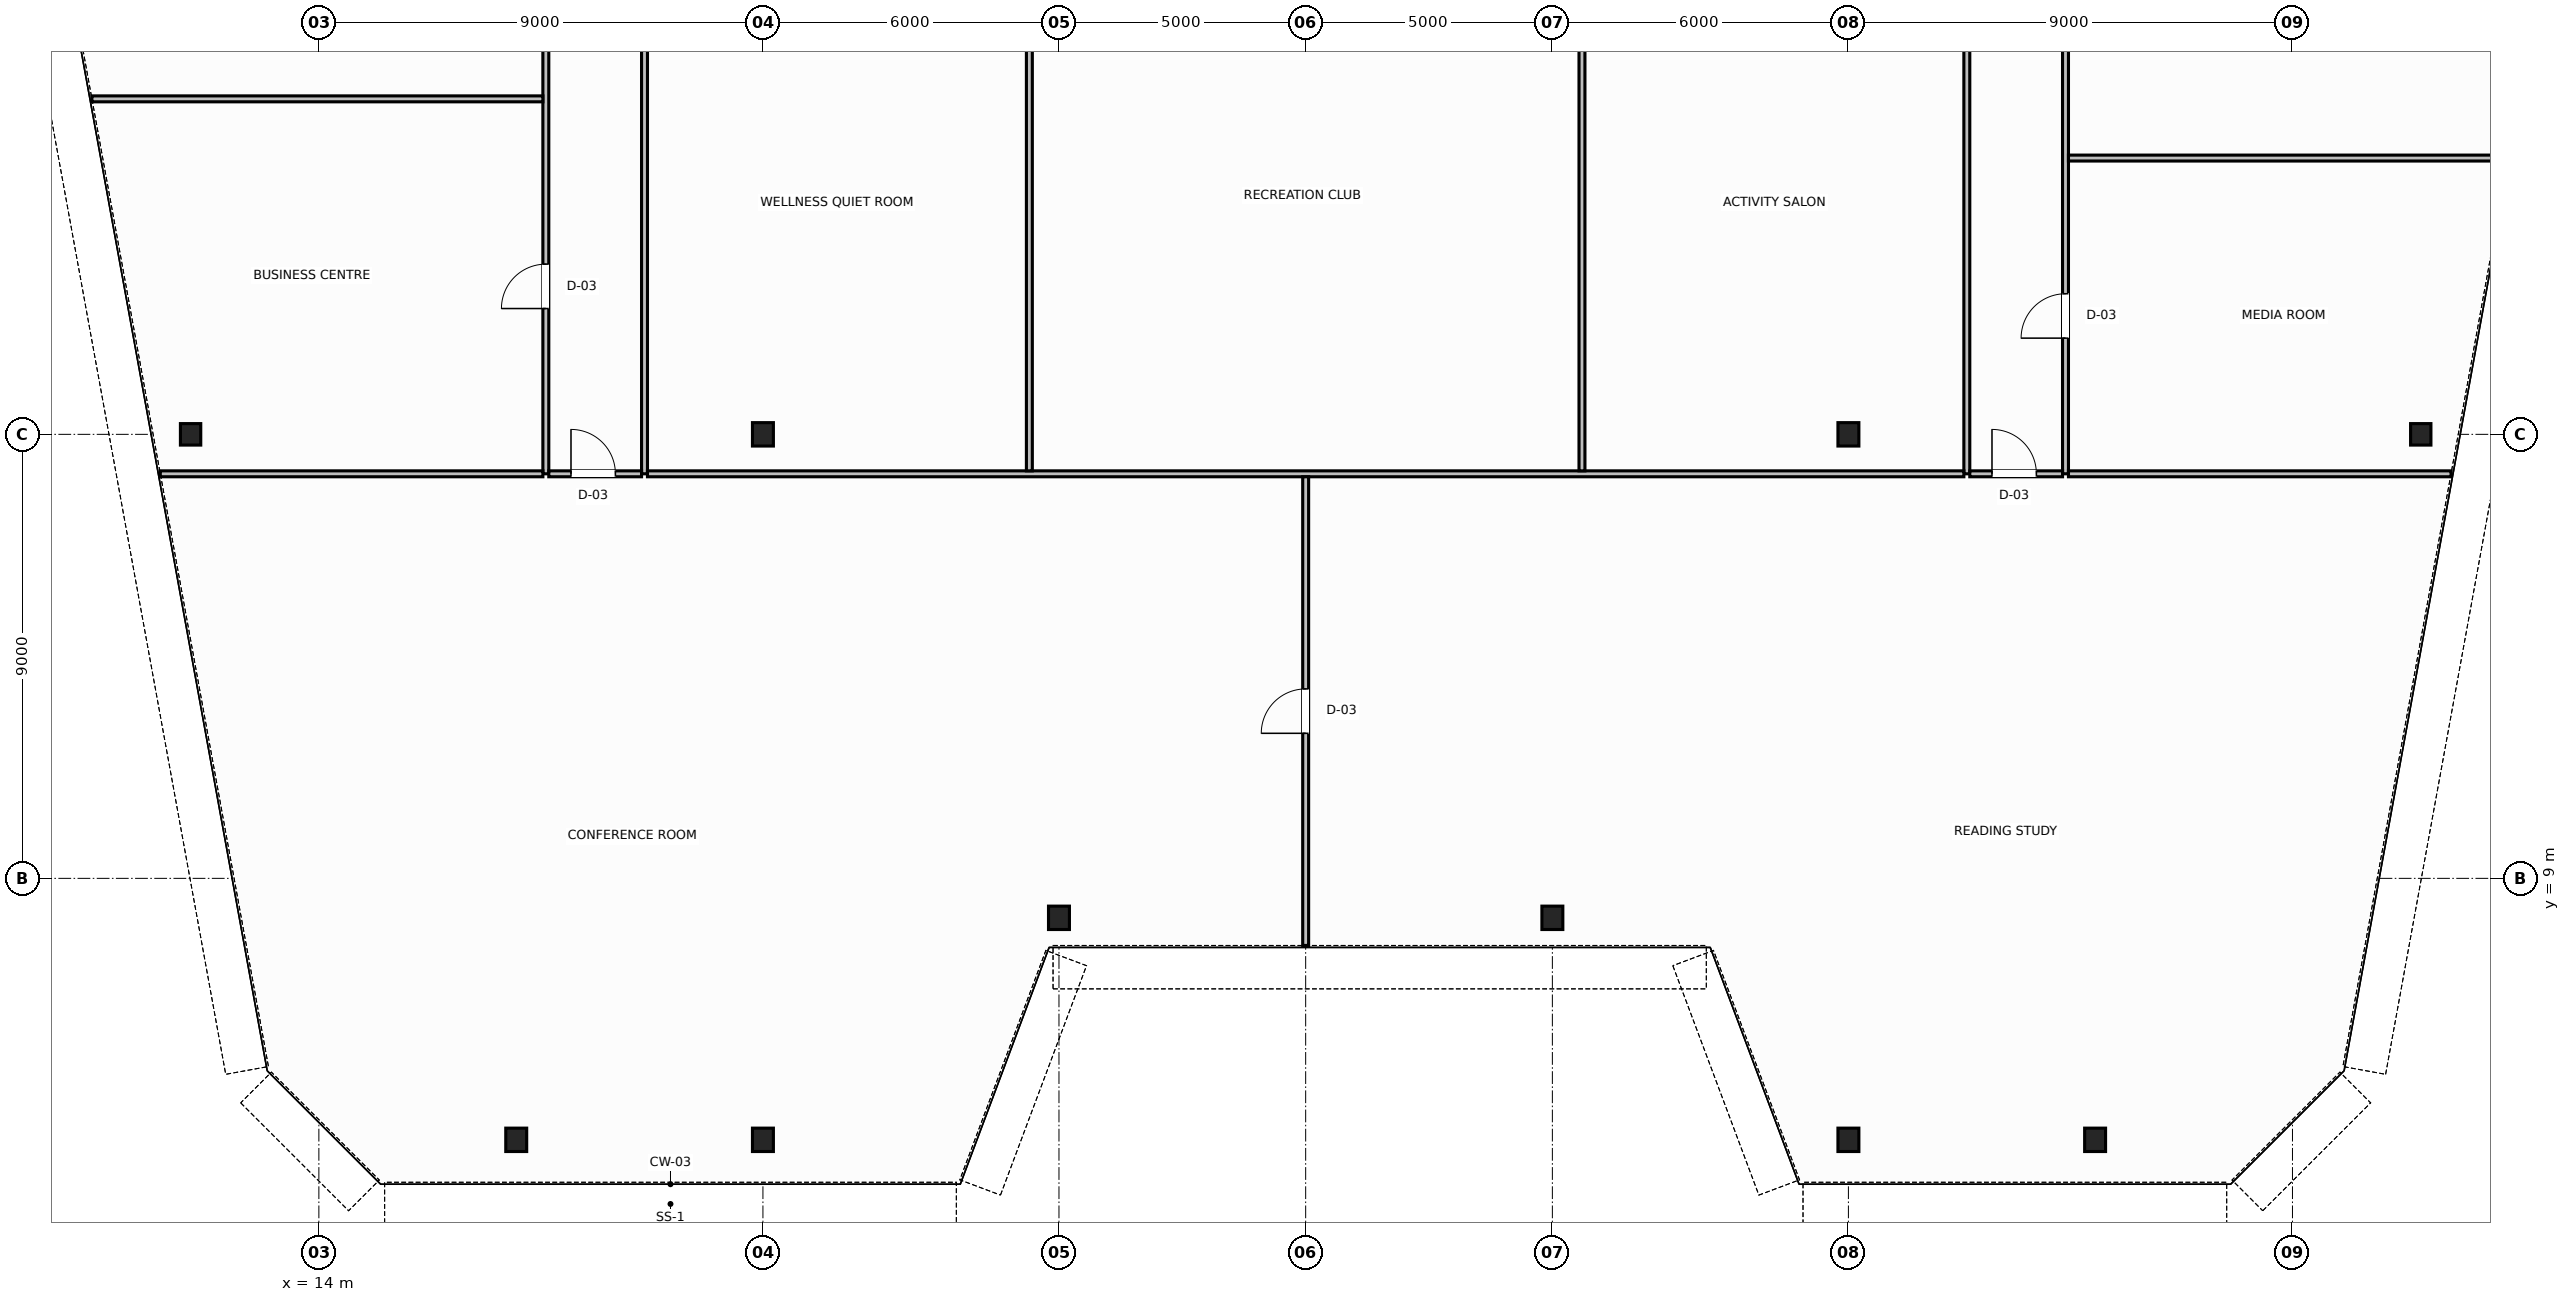
"""IFC4 building model, lengths in metres.
Left out: names, types, materials, properties, quantities, classifications, styles, units other than length and angle.
Written with IfcOpenShell. Run it as: python <this file> out.ifc"""

import sys

from ifc_helpers import new_model, si_unit, direction, frame, frame_2d, origin, origin_2d, place, context, subcontext, project, spatial, rectangle, i_section, extrude, source, transform, mapped, element, fill, save


model = new_model("IFC4")
c1 = context("Model", 3, precision=1e-05, world=origin(), true_north=direction((0.0, 1.0)))
c2 = subcontext(c1, "Body", "Model", "MODEL_VIEW")
j1 = project(units=[si_unit("LENGTHUNIT", "METRE"), si_unit("PLANEANGLEUNIT", "RADIAN")], contexts=[c1])
p1 = place(None, origin())
s1 = spatial("IfcSite", under=j1, at=p1, CompositionType="ELEMENT")
p2 = place(p1, origin())
s2 = spatial("IfcBuilding", under=s1, at=p2, CompositionType="ELEMENT")
p3 = place(p2, frame((0.0, 0.0, 169.0)))
s3 = spatial("IfcBuildingStorey", under=s2, at=p3, CompositionType="ELEMENT", Elevation=169.0)
m1 = source(origin(), c2, "Body", "SweptSolid", [
    extrude(i_section(OverallWidth=0.412, OverallDepth=0.435, WebThickness=0.036, FlangeThickness=0.05, FilletRadius=0.015, at=origin_2d()), origin(), (0.0, 0.0, 1.0), 3.8),
])
for number, where, z_axis, x_axis in (
    (1, (11.4, 18.0, 0.0), (0.0, 0.0, 1.0), (1.0, 0.0, 0.0)),
    (2, (56.6, 18.0, 0.0), (0.0, 0.0, 1.0), (1.0, 0.0, 0.0)),
):
    element("IfcColumn", number, at=place(p3, frame(where, z_axis=z_axis, x_axis=x_axis)), inside=s3, PredefinedType="COLUMN", context=c2, shape_type="MappedRepresentation", body=[
        mapped(m1, transform((0.0, 0.0, 0.0), scale=1.0)),
    ])
m2 = source(origin(), c2, "Body", "SweptSolid", [
    extrude(i_section(OverallWidth=0.424, OverallDepth=0.474, WebThickness=0.047, FlangeThickness=0.065, FilletRadius=0.015, at=origin_2d()), origin(), (0.0, 0.0, 1.0), 3.8),
])
for number, where, z_axis, x_axis in (
    (3, (23.0, 18.0, 0.0), (0.0, 0.0, 1.0), (1.0, 0.0, 0.0)),
    (4, (45.0, 18.0, 0.0), (0.0, 0.0, 1.0), (1.0, 0.0, 0.0)),
    (5, (18.0, 3.7, 0.0), (0.0, 0.0, 1.0), (1.0, 0.0, 0.0)),
    (6, (23.0, 3.7, 0.0), (0.0, 0.0, 1.0), (1.0, 0.0, 0.0)),
    (7, (29.0, 8.2, 0.0), (0.0, 0.0, 1.0), (1.0, 0.0, 0.0)),
    (8, (39.0, 8.2, 0.0), (0.0, 0.0, 1.0), (1.0, 0.0, 0.0)),
    (9, (45.0, 3.7, 0.0), (0.0, 0.0, 1.0), (1.0, 0.0, 0.0)),
    (10, (50.0, 3.7, 0.0), (0.0, 0.0, 1.0), (1.0, 0.0, 0.0)),
):
    element("IfcColumn", number, at=place(p3, frame(where, z_axis=z_axis, x_axis=x_axis)), inside=s3, PredefinedType="COLUMN", context=c2, shape_type="MappedRepresentation", body=[
        mapped(m2, transform((0.0, 0.0, 0.0), scale=1.0)),
    ])
p4 = place(p3, frame((18.6, 17.2, 0.0), z_axis=(0.0, 0.0, 1.0), x_axis=(0.0, 1.0, 0.0)))
e11 = element("IfcWall", 11, at=p4, inside=s3, PredefinedType="PARTITIONING", context=c2, shape_type="SweptSolid", body=[
    extrude(rectangle(XDim=16.84, YDim=0.12, at=frame_2d((8.42, 0.0))), origin(), (0.0, 0.0, 1.0), 3.58),
])
p5 = place(p4, frame((3.35, 0.0, 0.0)))
e12 = element("IfcOpeningElement", 12, at=p5, cuts=e11, PredefinedType="OPENING", context=c2, shape_type="SweptSolid", body=[
    extrude(rectangle(XDim=0.9, YDim=2.15, at=frame_2d((0.45, 1.075))), frame((0.0, 0.07, 0.0), z_axis=(0.0, -1.0, 0.0), x_axis=(1.0, 0.0, 0.0)), (0.0, 0.0, 1.0), 0.14),
])
p6 = place(p4, frame((11.77, 0.0, 0.0)))
e13 = element("IfcOpeningElement", 13, at=p6, cuts=e11, PredefinedType="OPENING", context=c2, shape_type="SweptSolid", body=[
    extrude(rectangle(XDim=0.9, YDim=2.15, at=frame_2d((0.45, 1.075))), frame((0.0, 0.07, 0.0), z_axis=(0.0, -1.0, 0.0), x_axis=(1.0, 0.0, 0.0)), (0.0, 0.0, 1.0), 0.14),
])
for number, where, z_axis, x_axis in (
    (14, (20.6, 17.2, 0.0), (0.0, 0.0, 1.0), (0.0, 1.0, 0.0)),
    (15, (47.4, 17.2, 0.0), (0.0, 0.0, 1.0), (0.0, 1.0, 0.0)),
):
    element("IfcWall", number, at=place(p3, frame(where, z_axis=z_axis, x_axis=x_axis)), inside=s3, PredefinedType="PARTITIONING", context=c2, shape_type="SweptSolid", body=[
        extrude(rectangle(XDim=16.84, YDim=0.12, at=frame_2d((8.42, 0.0))), origin(), (0.0, 0.0, 1.0), 3.58),
    ])
p7 = place(p3, frame((49.4, 17.2, 0.0), z_axis=(0.0, 0.0, 1.0), x_axis=(0.0, 1.0, 0.0)))
e16 = element("IfcWall", 16, at=p7, inside=s3, PredefinedType="PARTITIONING", context=c2, shape_type="SweptSolid", body=[
    extrude(rectangle(XDim=16.84, YDim=0.12, at=frame_2d((8.42, 0.0))), origin(), (0.0, 0.0, 1.0), 3.58),
])
p8 = place(p7, frame((2.75, 0.0, 0.0)))
e17 = element("IfcOpeningElement", 17, at=p8, cuts=e16, PredefinedType="OPENING", context=c2, shape_type="SweptSolid", body=[
    extrude(rectangle(XDim=0.9, YDim=2.15, at=frame_2d((0.45, 1.075))), frame((0.0, 0.07, 0.0), z_axis=(0.0, -1.0, 0.0), x_axis=(1.0, 0.0, 0.0)), (0.0, 0.0, 1.0), 0.14),
])
p9 = place(p7, frame((9.05, 0.0, 0.0)))
e18 = element("IfcOpeningElement", 18, at=p9, cuts=e16, PredefinedType="OPENING", context=c2, shape_type="SweptSolid", body=[
    extrude(rectangle(XDim=0.9, YDim=2.15, at=frame_2d((0.45, 1.075))), frame((0.0, 0.07, 0.0), z_axis=(0.0, -1.0, 0.0), x_axis=(1.0, 0.0, 0.0)), (0.0, 0.0, 1.0), 0.14),
])
p10 = place(p7, frame((14.27, 0.0, 0.0)))
e19 = element("IfcOpeningElement", 19, at=p10, cuts=e16, PredefinedType="OPENING", context=c2, shape_type="SweptSolid", body=[
    extrude(rectangle(XDim=0.9, YDim=2.15, at=frame_2d((0.45, 1.075))), frame((0.0, 0.07, 0.0), z_axis=(0.0, -1.0, 0.0), x_axis=(1.0, 0.0, 0.0)), (0.0, 0.0, 1.0), 0.14),
])
p11 = place(p3, frame((18.66, 17.2, 0.0), z_axis=(0.0, 0.0, 1.0), x_axis=(1.0, 0.0, 0.0)))
e20 = element("IfcWall", 20, at=p11, inside=s3, PredefinedType="PARTITIONING", context=c2, shape_type="SweptSolid", body=[
    extrude(rectangle(XDim=1.88, YDim=0.12, at=frame_2d((0.94, 0.0))), origin(), (0.0, 0.0, 1.0), 3.58),
])
p12 = place(p11, frame((0.45, 0.0, 0.0)))
e21 = element("IfcOpeningElement", 21, at=p12, cuts=e20, PredefinedType="OPENING", context=c2, shape_type="SweptSolid", body=[
    extrude(rectangle(XDim=0.9, YDim=2.15, at=frame_2d((0.45, 1.075))), frame((0.0, 0.07, 0.0), z_axis=(0.0, -1.0, 0.0), x_axis=(1.0, 0.0, 0.0)), (0.0, 0.0, 1.0), 0.14),
])
p13 = place(p3, frame((47.46, 17.2, 0.0), z_axis=(0.0, 0.0, 1.0), x_axis=(1.0, 0.0, 0.0)))
e22 = element("IfcWall", 22, at=p13, inside=s3, PredefinedType="PARTITIONING", context=c2, shape_type="SweptSolid", body=[
    extrude(rectangle(XDim=1.88, YDim=0.12, at=frame_2d((0.94, 0.0))), origin(), (0.0, 0.0, 1.0), 3.58),
])
p14 = place(p13, frame((0.45, 0.0, 0.0)))
e23 = element("IfcOpeningElement", 23, at=p14, cuts=e22, PredefinedType="OPENING", context=c2, shape_type="SweptSolid", body=[
    extrude(rectangle(XDim=0.9, YDim=2.15, at=frame_2d((0.45, 1.075))), frame((0.0, 0.07, 0.0), z_axis=(0.0, -1.0, 0.0), x_axis=(1.0, 0.0, 0.0)), (0.0, 0.0, 1.0), 0.14),
])
p15 = place(p3, frame((10.786, 17.2, 0.0), z_axis=(0.0, 0.0, 1.0), x_axis=(1.0, 0.0, 0.0)))
e24 = element("IfcWall", 24, at=p15, inside=s3, PredefinedType="PARTITIONING", context=c2, shape_type="SweptSolid", body=[
    extrude(rectangle(XDim=7.754, YDim=0.12, at=frame_2d((3.877, 0.0))), origin(), (0.0, 0.0, 1.0), 3.58),
])
p16 = place(p3, frame((9.4, 24.8, 0.0), z_axis=(0.0, 0.0, 1.0), x_axis=(1.0, 0.0, 0.0)))
e25 = element("IfcWall", 25, at=p16, inside=s3, PredefinedType="PARTITIONING", context=c2, shape_type="SweptSolid", body=[
    extrude(rectangle(XDim=9.14, YDim=0.12, at=frame_2d((4.57, 0.0))), origin(), (0.0, 0.0, 1.0), 3.58),
])
p17 = place(p3, frame((49.46, 17.2, 0.0), z_axis=(0.0, 0.0, 1.0), x_axis=(1.0, 0.0, 0.0)))
e26 = element("IfcWall", 26, at=p17, inside=s3, PredefinedType="PARTITIONING", context=c2, shape_type="SweptSolid", body=[
    extrude(rectangle(XDim=7.754, YDim=0.12, at=frame_2d((3.877, 0.0))), origin(), (0.0, 0.0, 1.0), 3.58),
])
p18 = place(p3, frame((49.46, 23.6, 0.0), z_axis=(0.0, 0.0, 1.0), x_axis=(1.0, 0.0, 0.0)))
e27 = element("IfcWall", 27, at=p18, inside=s3, PredefinedType="PARTITIONING", context=c2, shape_type="SweptSolid", body=[
    extrude(rectangle(XDim=8.922, YDim=0.12, at=frame_2d((4.461, 0.0))), origin(), (0.0, 0.0, 1.0), 3.58),
])
p19 = place(p3, frame((20.66, 17.2, 0.0), z_axis=(0.0, 0.0, 1.0), x_axis=(1.0, 0.0, 0.0)))
e28 = element("IfcWall", 28, at=p19, inside=s3, PredefinedType="PARTITIONING", context=c2, shape_type="SweptSolid", body=[
    extrude(rectangle(XDim=26.68, YDim=0.12, at=frame_2d((13.34, 0.0))), origin(), (0.0, 0.0, 1.0), 3.58),
])
for number, where, z_axis, x_axis in (
    (29, (28.4, 17.26, 0.0), (0.0, 0.0, 1.0), (0.0, 1.0, 0.0)),
    (30, (39.6, 17.26, 0.0), (0.0, 0.0, 1.0), (0.0, 1.0, 0.0)),
):
    element("IfcWall", number, at=place(p3, frame(where, z_axis=z_axis, x_axis=x_axis)), inside=s3, PredefinedType="PARTITIONING", context=c2, shape_type="SweptSolid", body=[
        extrude(rectangle(XDim=16.78, YDim=0.12, at=frame_2d((8.39, 0.0))), origin(), (0.0, 0.0, 1.0), 3.58),
    ])
p20 = place(p3, frame((34.0, 7.64, 0.0), z_axis=(0.0, 0.0, 1.0), x_axis=(0.0, 1.0, 0.0)))
e31 = element("IfcWall", 31, at=p20, inside=s3, PredefinedType="PARTITIONING", context=c2, shape_type="SweptSolid", body=[
    extrude(rectangle(XDim=9.5, YDim=0.12, at=frame_2d((4.75, 0.0))), origin(), (0.0, 0.0, 1.0), 3.58),
])
p21 = place(p20, frame((4.3, 0.0, 0.0)))
e32 = element("IfcOpeningElement", 32, at=p21, cuts=e31, PredefinedType="OPENING", context=c2, shape_type="SweptSolid", body=[
    extrude(rectangle(XDim=0.9, YDim=2.15, at=frame_2d((0.45, 1.075))), frame((0.0, 0.07, 0.0), z_axis=(0.0, -1.0, 0.0), x_axis=(1.0, 0.0, 0.0)), (0.0, 0.0, 1.0), 0.14),
])
m3 = source(origin(), c2, "Body", "SweptSolid", [
    extrude(rectangle(XDim=0.9, YDim=2.15, at=frame_2d((0.45, 1.075))), frame((0.0, 0.025, 0.0), z_axis=(0.0, -1.0, 0.0), x_axis=(1.0, 0.0, 0.0)), (0.0, 0.0, 1.0), 0.05),
])
p22 = place(p5, origin())
e33 = element("IfcDoor", 33, at=p22, inside=s3, OperationType="SINGLE_SWING_LEFT", PredefinedType="DOOR", context=c2, shape_type="MappedRepresentation", body=[
    mapped(m3, transform((0.0, 0.0, 0.0), scale=1.0)),
])
fill(e12, e33)
p23 = place(p8, origin())
e34 = element("IfcDoor", 34, at=p23, inside=s3, OperationType="SINGLE_SWING_RIGHT", PredefinedType="DOOR", context=c2, shape_type="MappedRepresentation", body=[
    mapped(m3, transform((0.0, 0.0, 0.0), scale=1.0)),
])
fill(e17, e34)
p24 = place(p12, origin())
e35 = element("IfcDoor", 35, at=p24, inside=s3, OperationType="SINGLE_SWING_LEFT", PredefinedType="DOOR", context=c2, shape_type="MappedRepresentation", body=[
    mapped(m3, transform((0.0, 0.0, 0.0), scale=1.0)),
])
fill(e21, e35)
p25 = place(p21, origin())
e36 = element("IfcDoor", 36, at=p25, inside=s3, OperationType="SINGLE_SWING_RIGHT", PredefinedType="DOOR", context=c2, shape_type="MappedRepresentation", body=[
    mapped(m3, transform((0.0, 0.0, 0.0), scale=1.0)),
])
fill(e32, e36)
p26 = place(p14, origin())
e37 = element("IfcDoor", 37, at=p26, inside=s3, OperationType="SINGLE_SWING_RIGHT", PredefinedType="DOOR", context=c2, shape_type="MappedRepresentation", body=[
    mapped(m3, transform((0.0, 0.0, 0.0), scale=1.0)),
])
fill(e23, e37)
save(model, sys.argv[1])
